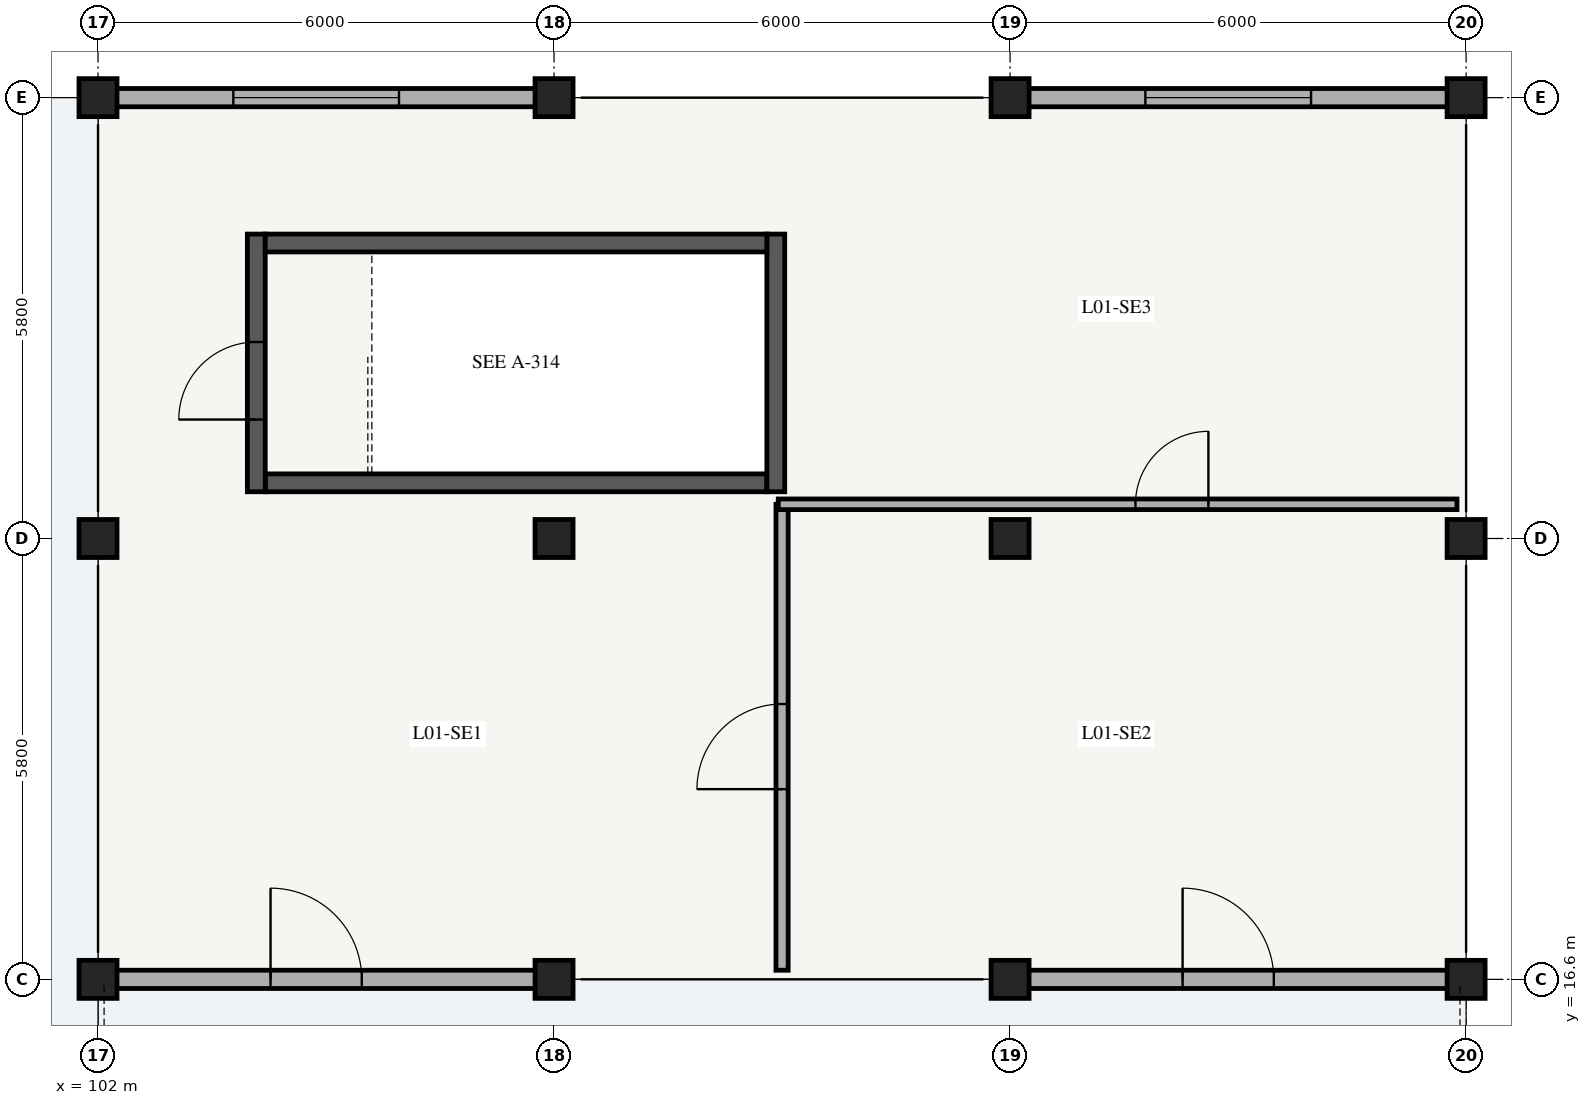
"""IFC4 building model, lengths in metres.
Left out: names, types, materials, properties, quantities, classifications, styles, units other than length and angle.
Written with IfcOpenShell. Run it as: python <this file> out.ifc"""

import sys

from ifc_helpers import new_model, si_unit, direction, frame, frame_2d, origin, origin_2d, place, context, subcontext, project, spatial, rectangle, extrude, element, fill, save


model = new_model("IFC4")
c1 = context("Model", 3, precision=1e-05, world=origin(), true_north=direction((0.0, 1.0)))
c2 = subcontext(c1, "Body", "Model", "MODEL_VIEW")
j1 = project(units=[si_unit("LENGTHUNIT", "METRE"), si_unit("PLANEANGLEUNIT", "RADIAN")], contexts=[c1])
p1 = place(None, origin())
s1 = spatial("IfcSite", under=j1, at=p1, CompositionType="ELEMENT")
p2 = place(p1, origin())
s2 = spatial("IfcBuilding", under=s1, at=p2, CompositionType="ELEMENT")
p3 = place(p2, frame((0.0, 0.0, 4.76)))
s3 = spatial("IfcBuildingStorey", under=s2, at=p3, CompositionType="ELEMENT", Elevation=4.76)
p4 = place(p3, frame((104.2, 23.133, 0.0), z_axis=(0.0, 0.0, 1.0), x_axis=(1.0, 0.0, 0.0)))
e1 = element("IfcWall", 1, at=p4, inside=s3, PredefinedType="SHEAR", context=c2, shape_type="SweptSolid", body=[
    extrude(rectangle(XDim=6.6, YDim=0.235, at=frame_2d((3.3, 0.0))), origin(), (0.0, 0.0, 1.0), 3.83),
])
p5 = place(p3, frame((110.917, 23.015, 0.0), z_axis=(0.0, 0.0, 1.0), x_axis=(0.0, 1.0, 0.0)))
e2 = element("IfcWall", 2, at=p5, inside=s3, PredefinedType="SHEAR", context=c2, shape_type="SweptSolid", body=[
    extrude(rectangle(XDim=3.39, YDim=0.235, at=frame_2d((1.695, 0.0))), origin(), (0.0, 0.0, 1.0), 3.83),
])
p6 = place(p3, frame((104.083, 23.015, 0.0), z_axis=(0.0, 0.0, 1.0), x_axis=(0.0, 1.0, 0.0)))
e3 = element("IfcWall", 3, at=p6, inside=s3, PredefinedType="SHEAR", context=c2, shape_type="SweptSolid", body=[
    extrude(rectangle(XDim=3.39, YDim=0.235, at=frame_2d((1.695, 0.0))), origin(), (0.0, 0.0, 1.0), 3.83),
])
p7 = place(p6, frame((0.95, 0.0, 0.0)))
e4 = element("IfcOpeningElement", 4, at=p7, cuts=e3, PredefinedType="OPENING", context=c2, shape_type="SweptSolid", body=[
    extrude(rectangle(XDim=1.02, YDim=2.14, at=frame_2d((0.51, 1.07))), frame((0.0, 0.127, 0.0), z_axis=(0.0, -1.0, 0.0), x_axis=(1.0, 0.0, 0.0)), (0.0, 0.0, 1.0), 0.255),
])
p8 = place(p3, frame((104.2, 26.288, 0.0), z_axis=(0.0, 0.0, 1.0), x_axis=(1.0, 0.0, 0.0)))
e5 = element("IfcWall", 5, at=p8, inside=s3, PredefinedType="SHEAR", context=c2, shape_type="SweptSolid", body=[
    extrude(rectangle(XDim=6.6, YDim=0.235, at=frame_2d((3.3, 0.0))), origin(), (0.0, 0.0, 1.0), 3.83),
])
for number, where, z_axis, x_axis in (
    (6, (102.0, 16.6, 0.0), (0.0, 0.0, 1.0), (1.0, 0.0, 0.0)),
    (7, (102.0, 22.4, 0.0), (0.0, 0.0, 1.0), (1.0, 0.0, 0.0)),
    (8, (102.0, 28.2, 0.0), (0.0, 0.0, 1.0), (1.0, 0.0, 0.0)),
    (9, (108.0, 16.6, 0.0), (0.0, 0.0, 1.0), (1.0, 0.0, 0.0)),
    (10, (108.0, 22.4, 0.0), (0.0, 0.0, 1.0), (1.0, 0.0, 0.0)),
    (11, (108.0, 28.2, 0.0), (0.0, 0.0, 1.0), (1.0, 0.0, 0.0)),
    (12, (114.0, 16.6, 0.0), (0.0, 0.0, 1.0), (1.0, 0.0, 0.0)),
    (13, (114.0, 22.4, 0.0), (0.0, 0.0, 1.0), (1.0, 0.0, 0.0)),
    (14, (114.0, 28.2, 0.0), (0.0, 0.0, 1.0), (1.0, 0.0, 0.0)),
    (15, (120.0, 16.6, 0.0), (0.0, 0.0, 1.0), (1.0, 0.0, 0.0)),
    (16, (120.0, 22.4, 0.0), (0.0, 0.0, 1.0), (1.0, 0.0, 0.0)),
    (17, (120.0, 28.2, 0.0), (0.0, 0.0, 1.0), (1.0, 0.0, 0.0)),
):
    element("IfcColumn", number, at=place(p3, frame(where, z_axis=z_axis, x_axis=x_axis)), inside=s3, PredefinedType="COLUMN", context=c2, shape_type="SweptSolid", body=[
        extrude(rectangle(XDim=0.5, YDim=0.5, at=origin_2d()), origin(), (0.0, 0.0, 1.0), 4.08),
    ])
p9 = place(p3, frame((102.22, 16.6, 0.0), z_axis=(0.0, 0.0, 1.0), x_axis=(1.0, 0.0, 0.0)))
e18 = element("IfcWall", 18, at=p9, inside=s3, PredefinedType="SOLIDWALL", context=c2, shape_type="SweptSolid", body=[
    extrude(rectangle(XDim=5.56, YDim=0.24, at=frame_2d((2.78, 0.0))), origin(), (0.0, 0.0, 1.0), 3.34),
])
p10 = place(p9, frame((2.05, 0.0, 0.0)))
e19 = element("IfcOpeningElement", 19, at=p10, cuts=e18, PredefinedType="OPENING", context=c2, shape_type="SweptSolid", body=[
    extrude(rectangle(XDim=1.2, YDim=2.15, at=frame_2d((0.6, 1.075))), frame((0.0, 0.13, 0.0), z_axis=(0.0, -1.0, 0.0), x_axis=(1.0, 0.0, 0.0)), (0.0, 0.0, 1.0), 0.26),
])
p11 = place(p3, frame((114.22, 16.6, 0.0), z_axis=(0.0, 0.0, 1.0), x_axis=(1.0, 0.0, 0.0)))
e20 = element("IfcWall", 20, at=p11, inside=s3, PredefinedType="SOLIDWALL", context=c2, shape_type="SweptSolid", body=[
    extrude(rectangle(XDim=5.56, YDim=0.24, at=frame_2d((2.78, 0.0))), origin(), (0.0, 0.0, 1.0), 3.34),
])
p12 = place(p11, frame((2.05, 0.0, 0.0)))
e21 = element("IfcOpeningElement", 21, at=p12, cuts=e20, PredefinedType="OPENING", context=c2, shape_type="SweptSolid", body=[
    extrude(rectangle(XDim=1.2, YDim=2.15, at=frame_2d((0.6, 1.075))), frame((0.0, 0.13, 0.0), z_axis=(0.0, -1.0, 0.0), x_axis=(1.0, 0.0, 0.0)), (0.0, 0.0, 1.0), 0.26),
])
p13 = place(p3, frame((102.22, 28.2, 0.0), z_axis=(0.0, 0.0, 1.0), x_axis=(1.0, 0.0, 0.0)))
e22 = element("IfcWall", 22, at=p13, inside=s3, PredefinedType="SOLIDWALL", context=c2, shape_type="SweptSolid", body=[
    extrude(rectangle(XDim=5.56, YDim=0.24, at=frame_2d((2.78, 0.0))), origin(), (0.0, 0.0, 1.0), 3.34),
])
p14 = place(p13, frame((1.56, 0.0, 0.55)))
e23 = element("IfcOpeningElement", 23, at=p14, cuts=e22, PredefinedType="OPENING", context=c2, shape_type="SweptSolid", body=[
    extrude(rectangle(XDim=2.18, YDim=2.05, at=frame_2d((1.09, 1.025))), frame((0.0, 0.13, 0.0), z_axis=(0.0, -1.0, 0.0), x_axis=(1.0, 0.0, 0.0)), (0.0, 0.0, 1.0), 0.26),
])
p15 = place(p3, frame((114.22, 28.2, 0.0), z_axis=(0.0, 0.0, 1.0), x_axis=(1.0, 0.0, 0.0)))
e24 = element("IfcWall", 24, at=p15, inside=s3, PredefinedType="SOLIDWALL", context=c2, shape_type="SweptSolid", body=[
    extrude(rectangle(XDim=5.56, YDim=0.24, at=frame_2d((2.78, 0.0))), origin(), (0.0, 0.0, 1.0), 3.34),
])
p16 = place(p15, frame((1.56, 0.0, 0.55)))
e25 = element("IfcOpeningElement", 25, at=p16, cuts=e24, PredefinedType="OPENING", context=c2, shape_type="SweptSolid", body=[
    extrude(rectangle(XDim=2.18, YDim=2.05, at=frame_2d((1.09, 1.025))), frame((0.0, 0.13, 0.0), z_axis=(0.0, -1.0, 0.0), x_axis=(1.0, 0.0, 0.0)), (0.0, 0.0, 1.0), 0.26),
])
p17 = place(p3, frame((111.0, 16.72, 0.0), z_axis=(0.0, 0.0, 1.0), x_axis=(0.0, 1.0, 0.0)))
e26 = element("IfcWall", 26, at=p17, inside=s3, PredefinedType="PARTITIONING", context=c2, shape_type="SweptSolid", body=[
    extrude(rectangle(XDim=6.13, YDim=0.16, at=frame_2d((3.065, 0.0))), origin(), (0.0, 0.0, 1.0), 2.86),
])
p18 = place(p17, frame((2.382, 0.0, 0.0)))
e27 = element("IfcOpeningElement", 27, at=p18, cuts=e26, PredefinedType="OPENING", context=c2, shape_type="SweptSolid", body=[
    extrude(rectangle(XDim=1.12, YDim=2.12, at=frame_2d((0.56, 1.06))), frame((0.0, 0.09, 0.0), z_axis=(0.0, -1.0, 0.0), x_axis=(1.0, 0.0, 0.0)), (0.0, 0.0, 1.0), 0.18),
])
p19 = place(p3, frame((110.95, 22.85, 0.0), z_axis=(0.0, 0.0, 1.0), x_axis=(1.0, 0.0, 0.0)))
e28 = element("IfcWall", 28, at=p19, inside=s3, PredefinedType="PLUMBINGWALL", context=c2, shape_type="SweptSolid", body=[
    extrude(rectangle(XDim=8.93, YDim=0.14, at=frame_2d((4.465, 0.0))), origin(), (0.0, 0.0, 1.0), 2.86),
])
p20 = place(p19, frame((4.699, 0.0, 0.0)))
e29 = element("IfcOpeningElement", 29, at=p20, cuts=e28, PredefinedType="OPENING", context=c2, shape_type="SweptSolid", body=[
    extrude(rectangle(XDim=0.96, YDim=2.1, at=frame_2d((0.48, 1.05))), frame((0.0, 0.08, 0.0), z_axis=(0.0, -1.0, 0.0), x_axis=(1.0, 0.0, 0.0)), (0.0, 0.0, 1.0), 0.16),
])
p21 = place(p10, origin())
e30 = element("IfcDoor", 30, at=p21, inside=s3, OperationType="SINGLE_SWING_LEFT", PredefinedType="DOOR", context=c2, shape_type="SweptSolid", body=[
    extrude(rectangle(XDim=1.2, YDim=2.15, at=frame_2d((0.6, 1.075))), frame((0.0, 0.025, 0.0), z_axis=(0.0, -1.0, 0.0), x_axis=(1.0, 0.0, 0.0)), (0.0, 0.0, 1.0), 0.05),
])
fill(e19, e30)
p22 = place(p12, origin())
e31 = element("IfcDoor", 31, at=p22, inside=s3, OperationType="SINGLE_SWING_LEFT", PredefinedType="DOOR", context=c2, shape_type="SweptSolid", body=[
    extrude(rectangle(XDim=1.2, YDim=2.15, at=frame_2d((0.6, 1.075))), frame((0.0, 0.025, 0.0), z_axis=(0.0, -1.0, 0.0), x_axis=(1.0, 0.0, 0.0)), (0.0, 0.0, 1.0), 0.05),
])
fill(e21, e31)
p23 = place(p14, origin())
e32 = element("IfcWindow", 32, at=p23, inside=s3, PartitioningType="SINGLE_PANEL", PredefinedType="WINDOW", context=c2, shape_type="SweptSolid", body=[
    extrude(rectangle(XDim=2.18, YDim=2.05, at=frame_2d((1.09, 1.025))), frame((0.0, 0.03, 0.0), z_axis=(0.0, -1.0, 0.0), x_axis=(1.0, 0.0, 0.0)), (0.0, 0.0, 1.0), 0.06),
])
fill(e23, e32)
p24 = place(p16, origin())
e33 = element("IfcWindow", 33, at=p24, inside=s3, PartitioningType="SINGLE_PANEL", PredefinedType="WINDOW", context=c2, shape_type="SweptSolid", body=[
    extrude(rectangle(XDim=2.18, YDim=2.05, at=frame_2d((1.09, 1.025))), frame((0.0, 0.03, 0.0), z_axis=(0.0, -1.0, 0.0), x_axis=(1.0, 0.0, 0.0)), (0.0, 0.0, 1.0), 0.06),
])
fill(e25, e33)
p25 = place(p7, origin())
e34 = element("IfcDoor", 34, at=p25, inside=s3, OperationType="SINGLE_SWING_LEFT", PredefinedType="DOOR", context=c2, shape_type="SweptSolid", body=[
    extrude(rectangle(XDim=1.02, YDim=2.14, at=frame_2d((0.51, 1.07))), frame((0.0, 0.025, 0.0), z_axis=(0.0, -1.0, 0.0), x_axis=(1.0, 0.0, 0.0)), (0.0, 0.0, 1.0), 0.05),
])
fill(e4, e34)
p26 = place(p18, origin())
e35 = element("IfcDoor", 35, at=p26, inside=s3, OperationType="SINGLE_SWING_LEFT", PredefinedType="DOOR", context=c2, shape_type="SweptSolid", body=[
    extrude(rectangle(XDim=1.12, YDim=2.12, at=frame_2d((0.56, 1.06))), frame((0.0, 0.025, 0.0), z_axis=(0.0, -1.0, 0.0), x_axis=(1.0, 0.0, 0.0)), (0.0, 0.0, 1.0), 0.05),
])
fill(e27, e35)
p27 = place(p20, origin())
e36 = element("IfcDoor", 36, at=p27, inside=s3, OperationType="SINGLE_SWING_RIGHT", PredefinedType="DOOR", context=c2, shape_type="SweptSolid", body=[
    extrude(rectangle(XDim=0.96, YDim=2.1, at=frame_2d((0.48, 1.05))), frame((0.0, 0.025, 0.0), z_axis=(0.0, -1.0, 0.0), x_axis=(1.0, 0.0, 0.0)), (0.0, 0.0, 1.0), 0.05),
])
fill(e29, e36)
save(model, sys.argv[1])
